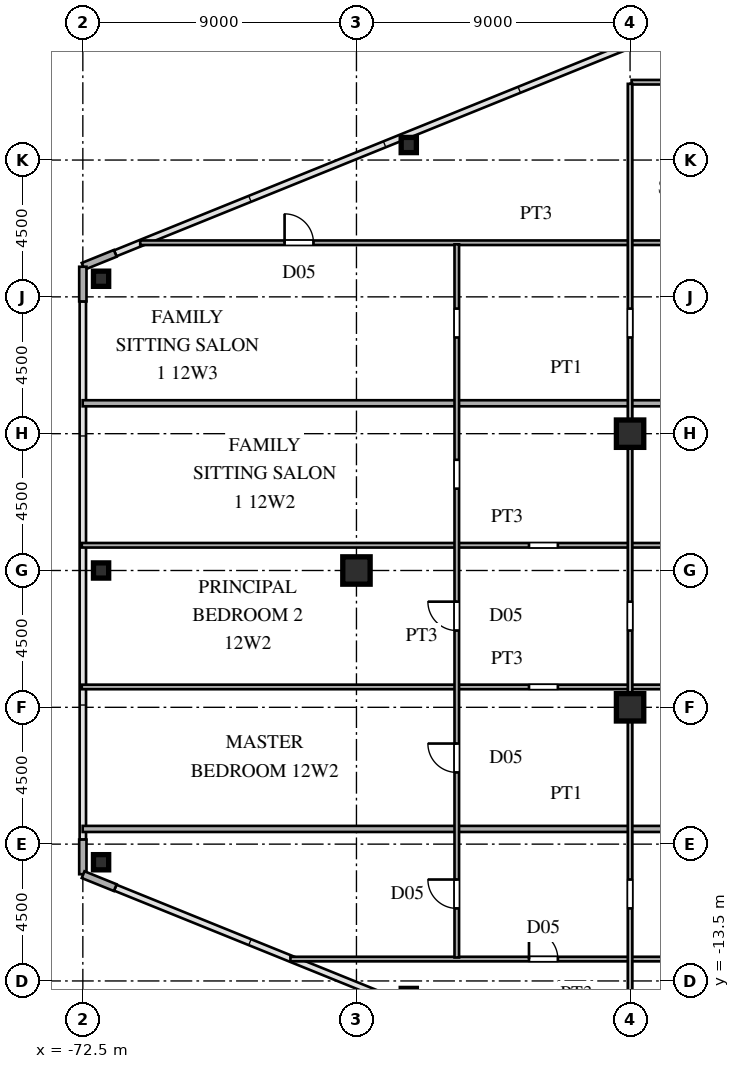
"""IFC4 building model, lengths in metres.
Left out: names, types, materials, properties, quantities, classifications, styles, units other than length and angle.
Written with IfcOpenShell. Run it as: python <this file> out.ifc"""

import sys

from ifc_helpers import new_model, si_unit, direction, frame, frame_2d, origin, origin_2d, place, context, subcontext, project, spatial, rectangle, hollow_rectangle, i_section, extrude, source, transform, mapped, element, fill, save


model = new_model("IFC4")
c1 = context("Model", 3, precision=1e-05, world=origin(), true_north=direction((0.0, 1.0)))
c2 = subcontext(c1, "Body", "Model", "MODEL_VIEW")
j1 = project(units=[si_unit("LENGTHUNIT", "METRE"), si_unit("PLANEANGLEUNIT", "RADIAN")], contexts=[c1])
p1 = place(None, origin())
s1 = spatial("IfcSite", under=j1, at=p1, CompositionType="ELEMENT")
p2 = place(p1, origin())
s2 = spatial("IfcBuilding", under=s1, at=p2, CompositionType="ELEMENT")
p3 = place(p2, frame((0.0, 0.0, 47.7)))
s3 = spatial("IfcBuildingStorey", under=s2, at=p3, CompositionType="ELEMENT", Elevation=47.7)
m1 = source(origin(), c2, "Body", "SweptSolid", [
    extrude(i_section(OverallWidth=0.9, OverallDepth=0.9, WebThickness=0.036, FlangeThickness=0.055, at=origin_2d()), origin(), (0.0, 0.0, 1.0), 3.6),
])
for number, where, z_axis, x_axis in (
    (1, (-54.5, -4.5, 0.0), (0.0, 0.0, 1.0), (1.0, 0.0, 0.0)),
    (2, (-54.5, 4.5, 0.0), (0.0, 0.0, 1.0), (1.0, 0.0, 0.0)),
    (3, (-63.5, 0.0, 0.0), (0.0, 0.0, 1.0), (1.0, 0.0, 0.0)),
):
    element("IfcColumn", number, at=place(p3, frame(where, z_axis=z_axis, x_axis=x_axis)), inside=s3, PredefinedType="COLUMN", context=c2, shape_type="MappedRepresentation", body=[
        mapped(m1, transform((0.0, 0.0, 0.0), scale=1.0)),
    ])
m2 = source(origin(), c2, "Body", "SweptSolid", [
    extrude(hollow_rectangle(XDim=0.5, YDim=0.5, WallThickness=0.02, at=origin_2d()), origin(), (0.0, 0.0, 1.0), 3.6),
])
for number, where, z_axis, x_axis in (
    (4, (-71.9, 9.596, 0.0), (0.0, 0.0, 1.0), (1.0, 0.0, 0.0)),
    (5, (-71.9, -9.596, 0.0), (0.0, 0.0, 1.0), (1.0, 0.0, 0.0)),
    (6, (-61.779, -13.994, 0.0), (0.0, 0.0, 1.0), (1.0, 0.0, 0.0)),
    (7, (-61.779, 13.994, 0.0), (0.0, 0.0, 1.0), (1.0, 0.0, 0.0)),
    (8, (-71.9, 0.0, 0.0), (0.0, 0.0, 1.0), (1.0, 0.0, 0.0)),
):
    element("IfcColumn", number, at=place(p3, frame(where, z_axis=z_axis, x_axis=x_axis)), inside=s3, PredefinedType="COLUMN", context=c2, shape_type="MappedRepresentation", body=[
        mapped(m2, transform((0.0, 0.0, 0.0), scale=1.0)),
    ])
for number, where, z_axis, x_axis in (
    (9, (-71.434, 10.431, 0.0), (0.0, 0.0, 1.0), (-0.927, -0.375, 0.0)),
    (10, (-72.5, 9.99, 0.0), (0.0, 0.0, 1.0), (0.0, -1.0, 0.0)),
    (11, (-72.5, -8.85, 0.0), (0.0, 0.0, 1.0), (0.0, -1.0, 0.0)),
    (12, (-72.491, -10.004, 0.0), (0.0, 0.0, 1.0), (0.927, -0.375, 0.0)),
):
    element("IfcWall", number, at=place(p3, frame(where, z_axis=z_axis, x_axis=x_axis)), inside=s3, PredefinedType="SOLIDWALL", context=c2, shape_type="SweptSolid", body=[
        extrude(rectangle(XDim=1.14, YDim=0.24, at=frame_2d((0.57, 0.0))), origin(), (0.0, 0.0, 1.0), 3.38),
    ])
p4 = place(p3, frame((-65.672, -12.78, 0.0), z_axis=(0.0, 0.0, 1.0), x_axis=(1.0, 0.0, 0.0)))
e13 = element("IfcWall", 13, at=p4, inside=s3, PredefinedType="PARTITIONING", context=c2, shape_type="SweptSolid", body=[
    extrude(rectangle(XDim=21.122, YDim=0.15, at=frame_2d((10.561, 0.0))), origin(), (0.0, 0.0, 1.0), 3.38),
])
p5 = place(p4, frame((15.697, 0.0, 0.0)))
e14 = element("IfcOpeningElement", 14, at=p5, cuts=e13, PredefinedType="OPENING", context=c2, shape_type="SweptSolid", body=[
    extrude(rectangle(XDim=0.95, YDim=2.15, at=frame_2d((0.475, 1.075))), frame((0.0, 0.085, 0.0), z_axis=(0.0, -1.0, 0.0), x_axis=(1.0, 0.0, 0.0)), (0.0, 0.0, 1.0), 0.17),
])
p6 = place(p4, frame((7.847, 0.0, 0.0)))
e15 = element("IfcOpeningElement", 15, at=p6, cuts=e13, PredefinedType="OPENING", context=c2, shape_type="SweptSolid", body=[
    extrude(rectangle(XDim=0.95, YDim=2.15, at=frame_2d((0.475, 1.075))), frame((0.0, 0.085, 0.0), z_axis=(0.0, -1.0, 0.0), x_axis=(1.0, 0.0, 0.0)), (0.0, 0.0, 1.0), 0.17),
])
p7 = place(p3, frame((-72.505, -8.5, 0.0), z_axis=(0.0, 0.0, 1.0), x_axis=(1.0, 0.0, 0.0)))
e16 = element("IfcWall", 16, at=p7, inside=s3, PredefinedType="PARTITIONING", context=c2, shape_type="SweptSolid", body=[
    extrude(rectangle(XDim=34.125, YDim=0.2, at=frame_2d((17.062, 0.0))), origin(), (0.0, 0.0, 1.0), 3.38),
])
p8 = place(p3, frame((-72.535, -3.83, 0.0), z_axis=(0.0, 0.0, 1.0), x_axis=(1.0, 0.0, 0.0)))
e17 = element("IfcWall", 17, at=p8, inside=s3, PredefinedType="PARTITIONING", context=c2, shape_type="SweptSolid", body=[
    extrude(rectangle(XDim=27.985, YDim=0.15, at=frame_2d((13.992, 0.0))), origin(), (0.0, 0.0, 1.0), 3.38),
])
p9 = place(p8, frame((22.56, 0.0, 0.0)))
e18 = element("IfcOpeningElement", 18, at=p9, cuts=e17, PredefinedType="OPENING", context=c2, shape_type="SweptSolid", body=[
    extrude(rectangle(XDim=0.95, YDim=2.15, at=frame_2d((0.475, 1.075))), frame((0.0, 0.085, 0.0), z_axis=(0.0, -1.0, 0.0), x_axis=(1.0, 0.0, 0.0)), (0.0, 0.0, 1.0), 0.17),
])
p10 = place(p8, frame((14.71, 0.0, 0.0)))
e19 = element("IfcOpeningElement", 19, at=p10, cuts=e17, PredefinedType="OPENING", context=c2, shape_type="SweptSolid", body=[
    extrude(rectangle(XDim=0.95, YDim=2.15, at=frame_2d((0.475, 1.075))), frame((0.0, 0.085, 0.0), z_axis=(0.0, -1.0, 0.0), x_axis=(1.0, 0.0, 0.0)), (0.0, 0.0, 1.0), 0.17),
])
p11 = place(p3, frame((-72.535, 0.83, 0.0), z_axis=(0.0, 0.0, 1.0), x_axis=(1.0, 0.0, 0.0)))
e20 = element("IfcWall", 20, at=p11, inside=s3, PredefinedType="PARTITIONING", context=c2, shape_type="SweptSolid", body=[
    extrude(rectangle(XDim=27.985, YDim=0.15, at=frame_2d((13.992, 0.0))), origin(), (0.0, 0.0, 1.0), 3.38),
])
p12 = place(p11, frame((22.56, 0.0, 0.0)))
e21 = element("IfcOpeningElement", 21, at=p12, cuts=e20, PredefinedType="OPENING", context=c2, shape_type="SweptSolid", body=[
    extrude(rectangle(XDim=0.95, YDim=2.15, at=frame_2d((0.475, 1.075))), frame((0.0, 0.085, 0.0), z_axis=(0.0, -1.0, 0.0), x_axis=(1.0, 0.0, 0.0)), (0.0, 0.0, 1.0), 0.17),
])
p13 = place(p11, frame((14.71, 0.0, 0.0)))
e22 = element("IfcOpeningElement", 22, at=p13, cuts=e20, PredefinedType="OPENING", context=c2, shape_type="SweptSolid", body=[
    extrude(rectangle(XDim=0.95, YDim=2.15, at=frame_2d((0.475, 1.075))), frame((0.0, 0.085, 0.0), z_axis=(0.0, -1.0, 0.0), x_axis=(1.0, 0.0, 0.0)), (0.0, 0.0, 1.0), 0.17),
])
p14 = place(p3, frame((-72.505, 5.5, 0.0), z_axis=(0.0, 0.0, 1.0), x_axis=(1.0, 0.0, 0.0)))
e23 = element("IfcWall", 23, at=p14, inside=s3, PredefinedType="PARTITIONING", context=c2, shape_type="SweptSolid", body=[
    extrude(rectangle(XDim=34.125, YDim=0.2, at=frame_2d((17.062, 0.0))), origin(), (0.0, 0.0, 1.0), 3.38),
])
p15 = place(p3, frame((-70.613, 10.78, 0.0), z_axis=(0.0, 0.0, 1.0), x_axis=(1.0, 0.0, 0.0)))
e24 = element("IfcWall", 24, at=p15, inside=s3, PredefinedType="PARTITIONING", context=c2, shape_type="SweptSolid", body=[
    extrude(rectangle(XDim=26.063, YDim=0.15, at=frame_2d((13.031, 0.0))), origin(), (0.0, 0.0, 1.0), 3.38),
])
p16 = place(p15, frame((4.749, 0.0, 0.0)))
e25 = element("IfcOpeningElement", 25, at=p16, cuts=e24, PredefinedType="OPENING", context=c2, shape_type="SweptSolid", body=[
    extrude(rectangle(XDim=0.95, YDim=2.15, at=frame_2d((0.475, 1.075))), frame((0.0, 0.085, 0.0), z_axis=(0.0, -1.0, 0.0), x_axis=(1.0, 0.0, 0.0)), (0.0, 0.0, 1.0), 0.17),
])
p17 = place(p3, frame((-54.45, 16.06, 0.0), z_axis=(0.0, 0.0, 1.0), x_axis=(1.0, 0.0, 0.0)))
e26 = element("IfcWall", 26, at=p17, inside=s3, PredefinedType="PARTITIONING", context=c2, shape_type="SweptSolid", body=[
    extrude(rectangle(XDim=9.9, YDim=0.15, at=frame_2d((4.95, 0.0))), origin(), (0.0, 0.0, 1.0), 3.38),
])
p18 = place(p17, frame((4.475, 0.0, 0.0)))
e27 = element("IfcOpeningElement", 27, at=p18, cuts=e26, PredefinedType="OPENING", context=c2, shape_type="SweptSolid", body=[
    extrude(rectangle(XDim=0.95, YDim=2.15, at=frame_2d((0.475, 1.075))), frame((0.0, 0.085, 0.0), z_axis=(0.0, -1.0, 0.0), x_axis=(1.0, 0.0, 0.0)), (0.0, 0.0, 1.0), 0.17),
])
p19 = place(p3, frame((-60.2, -12.728, 0.0), z_axis=(0.0, 0.0, 1.0), x_axis=(0.0, 1.0, 0.0)))
e28 = element("IfcWall", 28, at=p19, inside=s3, PredefinedType="PARTITIONING", context=c2, shape_type="SweptSolid", body=[
    extrude(rectangle(XDim=23.456, YDim=0.15, at=frame_2d((11.728, 0.0))), origin(), (0.0, 0.0, 1.0), 3.38),
])
p20 = place(p19, frame((1.614, 0.0, 0.0)))
e29 = element("IfcOpeningElement", 29, at=p20, cuts=e28, PredefinedType="OPENING", context=c2, shape_type="SweptSolid", body=[
    extrude(rectangle(XDim=0.95, YDim=2.15, at=frame_2d((0.475, 1.075))), frame((0.0, 0.085, 0.0), z_axis=(0.0, -1.0, 0.0), x_axis=(1.0, 0.0, 0.0)), (0.0, 0.0, 1.0), 0.17),
])
p21 = place(p19, frame((6.086, 0.0, 0.0)))
e30 = element("IfcOpeningElement", 30, at=p21, cuts=e28, PredefinedType="OPENING", context=c2, shape_type="SweptSolid", body=[
    extrude(rectangle(XDim=0.95, YDim=2.15, at=frame_2d((0.475, 1.075))), frame((0.0, 0.085, 0.0), z_axis=(0.0, -1.0, 0.0), x_axis=(1.0, 0.0, 0.0)), (0.0, 0.0, 1.0), 0.17),
])
p22 = place(p19, frame((10.753, 0.0, 0.0)))
e31 = element("IfcOpeningElement", 31, at=p22, cuts=e28, PredefinedType="OPENING", context=c2, shape_type="SweptSolid", body=[
    extrude(rectangle(XDim=0.95, YDim=2.15, at=frame_2d((0.475, 1.075))), frame((0.0, 0.085, 0.0), z_axis=(0.0, -1.0, 0.0), x_axis=(1.0, 0.0, 0.0)), (0.0, 0.0, 1.0), 0.17),
])
p23 = place(p19, frame((15.42, 0.0, 0.0)))
e32 = element("IfcOpeningElement", 32, at=p23, cuts=e28, PredefinedType="OPENING", context=c2, shape_type="SweptSolid", body=[
    extrude(rectangle(XDim=0.95, YDim=2.15, at=frame_2d((0.475, 1.075))), frame((0.0, 0.085, 0.0), z_axis=(0.0, -1.0, 0.0), x_axis=(1.0, 0.0, 0.0)), (0.0, 0.0, 1.0), 0.17),
])
p24 = place(p19, frame((20.392, 0.0, 0.0)))
e33 = element("IfcOpeningElement", 33, at=p24, cuts=e28, PredefinedType="OPENING", context=c2, shape_type="SweptSolid", body=[
    extrude(rectangle(XDim=0.95, YDim=2.15, at=frame_2d((0.475, 1.075))), frame((0.0, 0.085, 0.0), z_axis=(0.0, -1.0, 0.0), x_axis=(1.0, 0.0, 0.0)), (0.0, 0.0, 1.0), 0.17),
])
p25 = place(p3, frame((-54.5, -17.006, 0.0), z_axis=(0.0, 0.0, 1.0), x_axis=(0.0, 1.0, 0.0)))
e34 = element("IfcWall", 34, at=p25, inside=s3, PredefinedType="PARTITIONING", context=c2, shape_type="SweptSolid", body=[
    extrude(rectangle(XDim=33.012, YDim=0.15, at=frame_2d((16.506, 0.0))), origin(), (0.0, 0.0, 1.0), 2.68),
])
p26 = place(p25, frame((5.892, 0.0, 0.0)))
e35 = element("IfcOpeningElement", 35, at=p26, cuts=e34, PredefinedType="OPENING", context=c2, shape_type="SweptSolid", body=[
    extrude(rectangle(XDim=0.95, YDim=2.15, at=frame_2d((0.475, 1.075))), frame((0.0, 0.085, 0.0), z_axis=(0.0, -1.0, 0.0), x_axis=(1.0, 0.0, 0.0)), (0.0, 0.0, 1.0), 0.17),
])
p27 = place(p25, frame((15.031, 0.0, 0.0)))
e36 = element("IfcOpeningElement", 36, at=p27, cuts=e34, PredefinedType="OPENING", context=c2, shape_type="SweptSolid", body=[
    extrude(rectangle(XDim=0.95, YDim=2.15, at=frame_2d((0.475, 1.075))), frame((0.0, 0.085, 0.0), z_axis=(0.0, -1.0, 0.0), x_axis=(1.0, 0.0, 0.0)), (0.0, 0.0, 1.0), 0.17),
])
p28 = place(p25, frame((24.67, 0.0, 0.0)))
e37 = element("IfcOpeningElement", 37, at=p28, cuts=e34, PredefinedType="OPENING", context=c2, shape_type="SweptSolid", body=[
    extrude(rectangle(XDim=0.95, YDim=2.15, at=frame_2d((0.475, 1.075))), frame((0.0, 0.085, 0.0), z_axis=(0.0, -1.0, 0.0), x_axis=(1.0, 0.0, 0.0)), (0.0, 0.0, 1.0), 0.17),
])
m3 = source(origin(), c2, "Body", "SweptSolid", [
    extrude(rectangle(XDim=0.95, YDim=2.15, at=frame_2d((0.475, 1.075))), frame((0.0, 0.025, 0.0), z_axis=(0.0, -1.0, 0.0), x_axis=(1.0, 0.0, 0.0)), (0.0, 0.0, 1.0), 0.05),
])
p29 = place(p6, origin())
e38 = element("IfcDoor", 38, at=p29, inside=s3, OperationType="SINGLE_SWING_LEFT", PredefinedType="DOOR", context=c2, shape_type="MappedRepresentation", body=[
    mapped(m3, transform((0.0, 0.0, 0.0), scale=1.0)),
])
fill(e15, e38)
p30 = place(p16, origin())
e39 = element("IfcDoor", 39, at=p30, inside=s3, OperationType="SINGLE_SWING_LEFT", PredefinedType="DOOR", context=c2, shape_type="MappedRepresentation", body=[
    mapped(m3, transform((0.0, 0.0, 0.0), scale=1.0)),
])
fill(e25, e39)
p31 = place(p20, origin())
e40 = element("IfcDoor", 40, at=p31, inside=s3, OperationType="SINGLE_SWING_RIGHT", PredefinedType="DOOR", context=c2, shape_type="MappedRepresentation", body=[
    mapped(m3, transform((0.0, 0.0, 0.0), scale=1.0)),
])
fill(e29, e40)
p32 = place(p21, origin())
e41 = element("IfcDoor", 41, at=p32, inside=s3, OperationType="SINGLE_SWING_RIGHT", PredefinedType="DOOR", context=c2, shape_type="MappedRepresentation", body=[
    mapped(m3, transform((0.0, 0.0, 0.0), scale=1.0)),
])
fill(e30, e41)
p33 = place(p22, origin())
e42 = element("IfcDoor", 42, at=p33, inside=s3, OperationType="SINGLE_SWING_RIGHT", PredefinedType="DOOR", context=c2, shape_type="MappedRepresentation", body=[
    mapped(m3, transform((0.0, 0.0, 0.0), scale=1.0)),
])
fill(e31, e42)
save(model, sys.argv[1])
